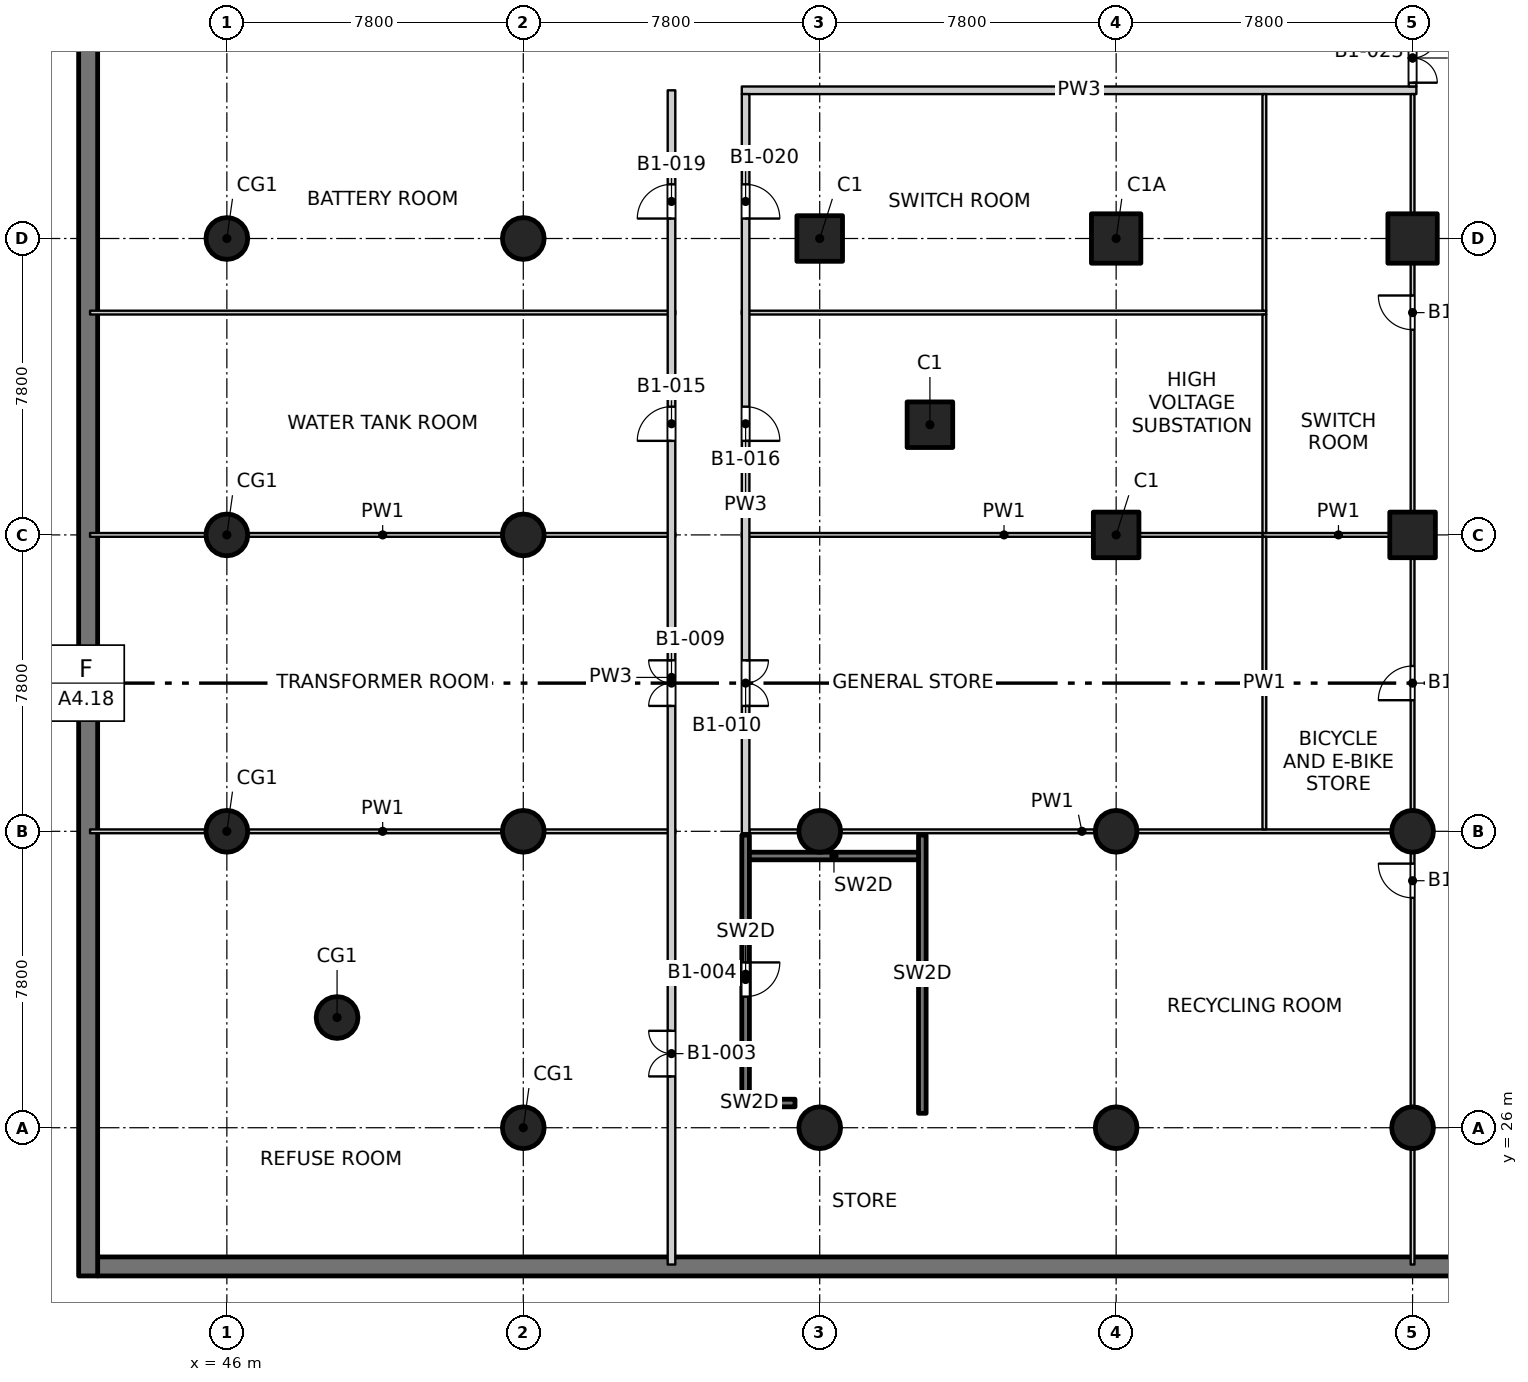
"""IFC4 building model, lengths in metres.
Left out: names, types, materials, properties, quantities, classifications, styles, units other than length and angle.
Written with IfcOpenShell. Run it as: python <this file> out.ifc"""

import sys

from ifc_helpers import new_model, si_unit, direction, frame, frame_2d, origin, origin_2d, place, context, subcontext, project, spatial, rectangle, circle, extrude, element, fill, save


model = new_model("IFC4")
c1 = context("Model", 3, precision=1e-05, world=origin(), true_north=direction((0.0, 1.0)))
c2 = subcontext(c1, "Body", "Model", "MODEL_VIEW")
j1 = project(units=[si_unit("LENGTHUNIT", "METRE"), si_unit("PLANEANGLEUNIT", "RADIAN")], contexts=[c1])
p1 = place(None, origin())
s1 = spatial("IfcSite", under=j1, at=p1, CompositionType="ELEMENT")
p2 = place(p1, origin())
s2 = spatial("IfcBuilding", under=s1, at=p2, CompositionType="ELEMENT")
p3 = place(p2, frame((0.0, 0.0, -4.5)))
s3 = spatial("IfcBuildingStorey", under=s2, at=p3, CompositionType="ELEMENT", Elevation=-4.5)
p4 = place(p3, frame((42.6, 22.35, -0.35), z_axis=(0.0, 0.0, 1.0), x_axis=(1.0, 0.0, 0.0)))
e1 = element("IfcWall", 1, at=p4, inside=s3, PredefinedType="SOLIDWALL", context=c2, shape_type="SweptSolid", body=[
    extrude(rectangle(XDim=84.8, YDim=0.5, at=frame_2d((42.4, 0.0))), origin(), (0.0, 0.0, 1.0), 4.45),
])
p5 = place(p3, frame((42.35, 22.1, -0.35), z_axis=(0.0, 0.0, 1.0), x_axis=(0.0, 1.0, 0.0)))
e2 = element("IfcWall", 2, at=p5, inside=s3, PredefinedType="SOLIDWALL", context=c2, shape_type="SweptSolid", body=[
    extrude(rectangle(XDim=70.2, YDim=0.5, at=frame_2d((35.1, 0.0))), origin(), (0.0, 0.0, 1.0), 4.45),
])
for number, where, z_axis, x_axis in (
    (3, (64.5, 44.5, -0.35), (0.0, 0.0, 1.0), (1.0, 0.0, 0.0)),
    (4, (61.6, 49.4, -0.35), (0.0, 0.0, 1.0), (1.0, 0.0, 0.0)),
    (5, (69.4, 41.6, -0.35), (0.0, 0.0, 1.0), (1.0, 0.0, 0.0)),
    (6, (77.2, 41.6, -0.35), (0.0, 0.0, 1.0), (1.0, 0.0, 0.0)),
):
    element("IfcColumn", number, at=place(p3, frame(where, z_axis=z_axis, x_axis=x_axis)), inside=s3, PredefinedType="COLUMN", context=c2, shape_type="SweptSolid", body=[
        extrude(rectangle(XDim=1.2, YDim=1.2, at=origin_2d()), origin(), (0.0, 0.0, 1.0), 4.45),
    ])
for number, where, z_axis, x_axis in (
    (7, (69.4, 49.4, -0.35), (0.0, 0.0, 1.0), (1.0, 0.0, 0.0)),
    (8, (77.2, 49.4, -0.35), (0.0, 0.0, 1.0), (1.0, 0.0, 0.0)),
):
    element("IfcColumn", number, at=place(p3, frame(where, z_axis=z_axis, x_axis=x_axis)), inside=s3, PredefinedType="COLUMN", context=c2, shape_type="SweptSolid", body=[
        extrude(rectangle(XDim=1.3, YDim=1.3, at=origin_2d()), origin(), (0.0, 0.0, 1.0), 4.45),
    ])
for number, where, z_axis, x_axis in (
    (9, (48.9, 28.9, -0.35), (0.0, 0.0, 1.0), (1.0, 0.0, 0.0)),
    (10, (46.0, 33.8, -0.35), (0.0, 0.0, 1.0), (1.0, 0.0, 0.0)),
    (11, (46.0, 41.6, -0.35), (0.0, 0.0, 1.0), (1.0, 0.0, 0.0)),
    (12, (46.0, 49.4, -0.35), (0.0, 0.0, 1.0), (1.0, 0.0, 0.0)),
    (13, (53.8, 26.0, -0.35), (0.0, 0.0, 1.0), (1.0, 0.0, 0.0)),
    (14, (53.8, 33.8, -0.35), (0.0, 0.0, 1.0), (1.0, 0.0, 0.0)),
    (15, (53.8, 41.6, -0.35), (0.0, 0.0, 1.0), (1.0, 0.0, 0.0)),
    (16, (53.8, 49.4, -0.35), (0.0, 0.0, 1.0), (1.0, 0.0, 0.0)),
    (17, (61.6, 26.0, -0.35), (0.0, 0.0, 1.0), (1.0, 0.0, 0.0)),
    (18, (61.6, 33.8, -0.35), (0.0, 0.0, 1.0), (1.0, 0.0, 0.0)),
    (19, (69.4, 26.0, -0.35), (0.0, 0.0, 1.0), (1.0, 0.0, 0.0)),
    (20, (69.4, 33.8, -0.35), (0.0, 0.0, 1.0), (1.0, 0.0, 0.0)),
    (21, (77.2, 26.0, -0.35), (0.0, 0.0, 1.0), (1.0, 0.0, 0.0)),
    (22, (77.2, 33.8, -0.35), (0.0, 0.0, 1.0), (1.0, 0.0, 0.0)),
):
    element("IfcColumn", number, at=place(p3, frame(where, z_axis=z_axis, x_axis=x_axis)), inside=s3, PredefinedType="COLUMN", context=c2, shape_type="SweptSolid", body=[
        extrude(circle(Radius=0.55, at=origin_2d()), origin(), (0.0, 0.0, 1.0), 4.45),
    ])
p6 = place(p3, frame((59.65, 26.38, 0.0), z_axis=(0.0, 0.0, 1.0), x_axis=(0.0, 1.0, 0.0)))
e23 = element("IfcWall", 23, at=p6, inside=s3, PredefinedType="SOLIDWALL", context=c2, shape_type="SweptSolid", body=[
    extrude(rectangle(XDim=7.32, YDim=0.2, at=frame_2d((3.66, 0.0))), origin(), (0.0, 0.0, 1.0), 4.1),
])
p7 = place(p6, frame((3.07, 0.0, 0.0)))
e24 = element("IfcOpeningElement", 24, at=p7, cuts=e23, PredefinedType="OPENING", context=c2, shape_type="SweptSolid", body=[
    extrude(rectangle(XDim=0.9, YDim=2.1, at=frame_2d((0.45, 1.05))), frame((0.0, 0.11, 0.0), z_axis=(0.0, -1.0, 0.0), x_axis=(1.0, 0.0, 0.0)), (0.0, 0.0, 1.0), 0.22),
])
p8 = place(p3, frame((64.3, 26.38, 0.0), z_axis=(0.0, 0.0, 1.0), x_axis=(0.0, 1.0, 0.0)))
e25 = element("IfcWall", 25, at=p8, inside=s3, PredefinedType="SOLIDWALL", context=c2, shape_type="SweptSolid", body=[
    extrude(rectangle(XDim=7.32, YDim=0.2, at=frame_2d((3.66, 0.0))), origin(), (0.0, 0.0, 1.0), 4.1),
])
p9 = place(p3, frame((59.75, 33.15, 0.0), z_axis=(0.0, 0.0, 1.0), x_axis=(1.0, 0.0, 0.0)))
e26 = element("IfcWall", 26, at=p9, inside=s3, PredefinedType="SOLIDWALL", context=c2, shape_type="SweptSolid", body=[
    extrude(rectangle(XDim=4.45, YDim=0.2, at=frame_2d((2.225, 0.0))), origin(), (0.0, 0.0, 1.0), 4.1),
])
p10 = place(p3, frame((59.75, 26.65, 0.0), z_axis=(0.0, 0.0, 1.0), x_axis=(1.0, 0.0, 0.0)))
e27 = element("IfcWall", 27, at=p10, inside=s3, PredefinedType="SOLIDWALL", context=c2, shape_type="SweptSolid", body=[
    extrude(rectangle(XDim=1.2, YDim=0.2, at=frame_2d((0.6, 0.0))), origin(), (0.0, 0.0, 1.0), 4.1),
])
p11 = place(p3, frame((42.4, 33.8, 0.0), z_axis=(0.0, 0.0, 1.0), x_axis=(1.0, 0.0, 0.0)))
e28 = element("IfcWall", 28, at=p11, inside=s3, PredefinedType="PARTITIONING", context=c2, shape_type="SweptSolid", body=[
    extrude(rectangle(XDim=15.4, YDim=0.1, at=frame_2d((7.7, 0.0))), origin(), (0.0, 0.0, 1.0), 4.1),
])
p12 = place(p3, frame((59.75, 33.8, 0.0), z_axis=(0.0, 0.0, 1.0), x_axis=(1.0, 0.0, 0.0)))
e29 = element("IfcWall", 29, at=p12, inside=s3, PredefinedType="PARTITIONING", context=c2, shape_type="SweptSolid", body=[
    extrude(rectangle(XDim=17.5, YDim=0.1, at=frame_2d((8.75, 0.0))), origin(), (0.0, 0.0, 1.0), 4.1),
])
p13 = place(p3, frame((42.4, 41.6, 0.0), z_axis=(0.0, 0.0, 1.0), x_axis=(1.0, 0.0, 0.0)))
e30 = element("IfcWall", 30, at=p13, inside=s3, PredefinedType="PARTITIONING", context=c2, shape_type="SweptSolid", body=[
    extrude(rectangle(XDim=15.4, YDim=0.1, at=frame_2d((7.7, 0.0))), origin(), (0.0, 0.0, 1.0), 4.1),
])
p14 = place(p3, frame((59.55, 41.6, 0.0), z_axis=(0.0, 0.0, 1.0), x_axis=(1.0, 0.0, 0.0)))
e31 = element("IfcWall", 31, at=p14, inside=s3, PredefinedType="PARTITIONING", context=c2, shape_type="SweptSolid", body=[
    extrude(rectangle(XDim=13.8, YDim=0.1, at=frame_2d((6.9, 0.0))), origin(), (0.0, 0.0, 1.0), 4.1),
])
p15 = place(p3, frame((73.25, 41.6, 0.0), z_axis=(0.0, 0.0, 1.0), x_axis=(1.0, 0.0, 0.0)))
e32 = element("IfcWall", 32, at=p15, inside=s3, PredefinedType="PARTITIONING", context=c2, shape_type="SweptSolid", body=[
    extrude(rectangle(XDim=4.0, YDim=0.1, at=frame_2d((2.0, 0.0))), origin(), (0.0, 0.0, 1.0), 4.1),
])
p16 = place(p3, frame((42.4, 47.45, 0.0), z_axis=(0.0, 0.0, 1.0), x_axis=(1.0, 0.0, 0.0)))
e33 = element("IfcWall", 33, at=p16, inside=s3, PredefinedType="PARTITIONING", context=c2, shape_type="SweptSolid", body=[
    extrude(rectangle(XDim=15.4, YDim=0.1, at=frame_2d((7.7, 0.0))), origin(), (0.0, 0.0, 1.0), 4.1),
])
p17 = place(p3, frame((59.55, 47.45, 0.0), z_axis=(0.0, 0.0, 1.0), x_axis=(1.0, 0.0, 0.0)))
e34 = element("IfcWall", 34, at=p17, inside=s3, PredefinedType="PARTITIONING", context=c2, shape_type="SweptSolid", body=[
    extrude(rectangle(XDim=13.8, YDim=0.1, at=frame_2d((6.9, 0.0))), origin(), (0.0, 0.0, 1.0), 4.1),
])
p18 = place(p3, frame((59.55, 53.3, 0.0), z_axis=(0.0, 0.0, 1.0), x_axis=(1.0, 0.0, 0.0)))
e35 = element("IfcWall", 35, at=p18, inside=s3, PredefinedType="PARTITIONING", context=c2, shape_type="SweptSolid", body=[
    extrude(rectangle(XDim=17.75, YDim=0.2, at=frame_2d((8.875, 0.0))), origin(), (0.0, 0.0, 1.0), 4.1),
])
p19 = place(p3, frame((57.7, 22.4, 0.0), z_axis=(0.0, 0.0, 1.0), x_axis=(0.0, 1.0, 0.0)))
e36 = element("IfcWall", 36, at=p19, inside=s3, PredefinedType="PARTITIONING", context=c2, shape_type="SweptSolid", body=[
    extrude(rectangle(XDim=30.9, YDim=0.2, at=frame_2d((15.45, 0.0))), origin(), (0.0, 0.0, 1.0), 4.1),
])
p20 = place(p19, frame((4.95, 0.0, 0.0)))
e37 = element("IfcOpeningElement", 37, at=p20, cuts=e36, PredefinedType="OPENING", context=c2, shape_type="SweptSolid", body=[
    extrude(rectangle(XDim=1.2, YDim=2.1, at=frame_2d((0.6, 1.05))), frame((0.0, 0.11, 0.0), z_axis=(0.0, -1.0, 0.0), x_axis=(1.0, 0.0, 0.0)), (0.0, 0.0, 1.0), 0.22),
])
p21 = place(p19, frame((14.7, 0.0, 0.0)))
e38 = element("IfcOpeningElement", 38, at=p21, cuts=e36, PredefinedType="OPENING", context=c2, shape_type="SweptSolid", body=[
    extrude(rectangle(XDim=1.2, YDim=2.1, at=frame_2d((0.6, 1.05))), frame((0.0, 0.11, 0.0), z_axis=(0.0, -1.0, 0.0), x_axis=(1.0, 0.0, 0.0)), (0.0, 0.0, 1.0), 0.22),
])
p22 = place(p19, frame((21.675, 0.0, 0.0)))
e39 = element("IfcOpeningElement", 39, at=p22, cuts=e36, PredefinedType="OPENING", context=c2, shape_type="SweptSolid", body=[
    extrude(rectangle(XDim=0.9, YDim=2.1, at=frame_2d((0.45, 1.05))), frame((0.0, 0.11, 0.0), z_axis=(0.0, -1.0, 0.0), x_axis=(1.0, 0.0, 0.0)), (0.0, 0.0, 1.0), 0.22),
])
p23 = place(p19, frame((27.525, 0.0, 0.0)))
e40 = element("IfcOpeningElement", 40, at=p23, cuts=e36, PredefinedType="OPENING", context=c2, shape_type="SweptSolid", body=[
    extrude(rectangle(XDim=0.9, YDim=2.1, at=frame_2d((0.45, 1.05))), frame((0.0, 0.11, 0.0), z_axis=(0.0, -1.0, 0.0), x_axis=(1.0, 0.0, 0.0)), (0.0, 0.0, 1.0), 0.22),
])
p24 = place(p3, frame((59.65, 33.75, 0.0), z_axis=(0.0, 0.0, 1.0), x_axis=(0.0, 1.0, 0.0)))
e41 = element("IfcWall", 41, at=p24, inside=s3, PredefinedType="PARTITIONING", context=c2, shape_type="SweptSolid", body=[
    extrude(rectangle(XDim=19.45, YDim=0.2, at=frame_2d((9.725, 0.0))), origin(), (0.0, 0.0, 1.0), 4.1),
])
p25 = place(p24, frame((3.35, 0.0, 0.0)))
e42 = element("IfcOpeningElement", 42, at=p25, cuts=e41, PredefinedType="OPENING", context=c2, shape_type="SweptSolid", body=[
    extrude(rectangle(XDim=1.2, YDim=2.1, at=frame_2d((0.6, 1.05))), frame((0.0, 0.11, 0.0), z_axis=(0.0, -1.0, 0.0), x_axis=(1.0, 0.0, 0.0)), (0.0, 0.0, 1.0), 0.22),
])
p26 = place(p24, frame((10.325, 0.0, 0.0)))
e43 = element("IfcOpeningElement", 43, at=p26, cuts=e41, PredefinedType="OPENING", context=c2, shape_type="SweptSolid", body=[
    extrude(rectangle(XDim=0.9, YDim=2.1, at=frame_2d((0.45, 1.05))), frame((0.0, 0.11, 0.0), z_axis=(0.0, -1.0, 0.0), x_axis=(1.0, 0.0, 0.0)), (0.0, 0.0, 1.0), 0.22),
])
p27 = place(p24, frame((16.175, 0.0, 0.0)))
e44 = element("IfcOpeningElement", 44, at=p27, cuts=e41, PredefinedType="OPENING", context=c2, shape_type="SweptSolid", body=[
    extrude(rectangle(XDim=0.9, YDim=2.1, at=frame_2d((0.45, 1.05))), frame((0.0, 0.11, 0.0), z_axis=(0.0, -1.0, 0.0), x_axis=(1.0, 0.0, 0.0)), (0.0, 0.0, 1.0), 0.22),
])
p28 = place(p3, frame((73.3, 33.85, 0.0), z_axis=(0.0, 0.0, 1.0), x_axis=(0.0, 1.0, 0.0)))
e45 = element("IfcWall", 45, at=p28, inside=s3, PredefinedType="PARTITIONING", context=c2, shape_type="SweptSolid", body=[
    extrude(rectangle(XDim=7.7, YDim=0.1, at=frame_2d((3.85, 0.0))), origin(), (0.0, 0.0, 1.0), 4.1),
])
p29 = place(p3, frame((73.3, 41.65, 0.0), z_axis=(0.0, 0.0, 1.0), x_axis=(0.0, 1.0, 0.0)))
e46 = element("IfcWall", 46, at=p29, inside=s3, PredefinedType="PARTITIONING", context=c2, shape_type="SweptSolid", body=[
    extrude(rectangle(XDim=5.75, YDim=0.1, at=frame_2d((2.875, 0.0))), origin(), (0.0, 0.0, 1.0), 4.1),
])
p30 = place(p3, frame((73.3, 47.5, 0.0), z_axis=(0.0, 0.0, 1.0), x_axis=(0.0, 1.0, 0.0)))
e47 = element("IfcWall", 47, at=p30, inside=s3, PredefinedType="PARTITIONING", context=c2, shape_type="SweptSolid", body=[
    extrude(rectangle(XDim=5.7, YDim=0.1, at=frame_2d((2.85, 0.0))), origin(), (0.0, 0.0, 1.0), 4.1),
])
p31 = place(p3, frame((77.2, 22.4, 0.0), z_axis=(0.0, 0.0, 1.0), x_axis=(0.0, 1.0, 0.0)))
e48 = element("IfcWall", 48, at=p31, inside=s3, PredefinedType="PARTITIONING", context=c2, shape_type="SweptSolid", body=[
    extrude(rectangle(XDim=30.8, YDim=0.1, at=frame_2d((15.4, 0.0))), origin(), (0.0, 0.0, 1.0), 4.1),
])
p32 = place(p31, frame((9.65, 0.0, 0.0)))
e49 = element("IfcOpeningElement", 49, at=p32, cuts=e48, PredefinedType="OPENING", context=c2, shape_type="SweptSolid", body=[
    extrude(rectangle(XDim=0.9, YDim=2.1, at=frame_2d((0.45, 1.05))), frame((0.0, 0.06, 0.0), z_axis=(0.0, -1.0, 0.0), x_axis=(1.0, 0.0, 0.0)), (0.0, 0.0, 1.0), 0.12),
])
p33 = place(p31, frame((14.85, 0.0, 0.0)))
e50 = element("IfcOpeningElement", 50, at=p33, cuts=e48, PredefinedType="OPENING", context=c2, shape_type="SweptSolid", body=[
    extrude(rectangle(XDim=0.9, YDim=2.1, at=frame_2d((0.45, 1.05))), frame((0.0, 0.06, 0.0), z_axis=(0.0, -1.0, 0.0), x_axis=(1.0, 0.0, 0.0)), (0.0, 0.0, 1.0), 0.12),
])
p34 = place(p31, frame((24.6, 0.0, 0.0)))
e51 = element("IfcOpeningElement", 51, at=p34, cuts=e48, PredefinedType="OPENING", context=c2, shape_type="SweptSolid", body=[
    extrude(rectangle(XDim=0.9, YDim=2.1, at=frame_2d((0.45, 1.05))), frame((0.0, 0.06, 0.0), z_axis=(0.0, -1.0, 0.0), x_axis=(1.0, 0.0, 0.0)), (0.0, 0.0, 1.0), 0.12),
])
p35 = place(p3, frame((77.2, 53.4, 0.0), z_axis=(0.0, 0.0, 1.0), x_axis=(0.0, 1.0, 0.0)))
e52 = element("IfcWall", 52, at=p35, inside=s3, PredefinedType="PARTITIONING", context=c2, shape_type="SweptSolid", body=[
    extrude(rectangle(XDim=1.5, YDim=0.2, at=frame_2d((0.75, 0.0))), origin(), (0.0, 0.0, 1.0), 4.1),
])
p36 = place(p35, frame((0.1, 0.0, 0.0)))
e53 = element("IfcOpeningElement", 53, at=p36, cuts=e52, PredefinedType="OPENING", context=c2, shape_type="SweptSolid", body=[
    extrude(rectangle(XDim=1.3, YDim=2.1, at=frame_2d((0.65, 1.05))), frame((0.0, 0.11, 0.0), z_axis=(0.0, -1.0, 0.0), x_axis=(1.0, 0.0, 0.0)), (0.0, 0.0, 1.0), 0.22),
])
p37 = place(p20, origin())
e54 = element("IfcDoor", 54, at=p37, inside=s3, OperationType="DOUBLE_DOOR_SINGLE_SWING", PredefinedType="DOOR", context=c2, shape_type="SweptSolid", body=[
    extrude(rectangle(XDim=1.2, YDim=2.1, at=frame_2d((0.6, 1.05))), frame((0.0, 0.025, 0.0), z_axis=(0.0, -1.0, 0.0), x_axis=(1.0, 0.0, 0.0)), (0.0, 0.0, 1.0), 0.05),
])
fill(e37, e54)
p38 = place(p7, origin())
e55 = element("IfcDoor", 55, at=p38, inside=s3, OperationType="SINGLE_SWING_LEFT", PredefinedType="DOOR", context=c2, shape_type="SweptSolid", body=[
    extrude(rectangle(XDim=0.9, YDim=2.1, at=frame_2d((0.45, 1.05))), frame((0.0, 0.025, 0.0), z_axis=(0.0, -1.0, 0.0), x_axis=(1.0, 0.0, 0.0)), (0.0, 0.0, 1.0), 0.05),
])
fill(e24, e55)
p39 = place(p32, origin())
e56 = element("IfcDoor", 56, at=p39, inside=s3, OperationType="SINGLE_SWING_RIGHT", PredefinedType="DOOR", context=c2, shape_type="SweptSolid", body=[
    extrude(rectangle(XDim=0.9, YDim=2.1, at=frame_2d((0.45, 1.05))), frame((0.0, 0.025, 0.0), z_axis=(0.0, -1.0, 0.0), x_axis=(1.0, 0.0, 0.0)), (0.0, 0.0, 1.0), 0.05),
])
fill(e49, e56)
p40 = place(p21, origin())
e57 = element("IfcDoor", 57, at=p40, inside=s3, OperationType="DOUBLE_DOOR_SINGLE_SWING", PredefinedType="DOOR", context=c2, shape_type="SweptSolid", body=[
    extrude(rectangle(XDim=1.2, YDim=2.1, at=frame_2d((0.6, 1.05))), frame((0.0, 0.025, 0.0), z_axis=(0.0, -1.0, 0.0), x_axis=(1.0, 0.0, 0.0)), (0.0, 0.0, 1.0), 0.05),
])
fill(e38, e57)
p41 = place(p25, origin())
e58 = element("IfcDoor", 58, at=p41, inside=s3, OperationType="DOUBLE_DOOR_SINGLE_SWING", PredefinedType="DOOR", context=c2, shape_type="SweptSolid", body=[
    extrude(rectangle(XDim=1.2, YDim=2.1, at=frame_2d((0.6, 1.05))), frame((0.0, 0.025, 0.0), z_axis=(0.0, -1.0, 0.0), x_axis=(1.0, 0.0, 0.0)), (0.0, 0.0, 1.0), 0.05),
])
fill(e42, e58)
p42 = place(p33, origin())
e59 = element("IfcDoor", 59, at=p42, inside=s3, OperationType="SINGLE_SWING_LEFT", PredefinedType="DOOR", context=c2, shape_type="SweptSolid", body=[
    extrude(rectangle(XDim=0.9, YDim=2.1, at=frame_2d((0.45, 1.05))), frame((0.0, 0.025, 0.0), z_axis=(0.0, -1.0, 0.0), x_axis=(1.0, 0.0, 0.0)), (0.0, 0.0, 1.0), 0.05),
])
fill(e50, e59)
p43 = place(p22, origin())
e60 = element("IfcDoor", 60, at=p43, inside=s3, OperationType="SINGLE_SWING_LEFT", PredefinedType="DOOR", context=c2, shape_type="SweptSolid", body=[
    extrude(rectangle(XDim=0.9, YDim=2.1, at=frame_2d((0.45, 1.05))), frame((0.0, 0.025, 0.0), z_axis=(0.0, -1.0, 0.0), x_axis=(1.0, 0.0, 0.0)), (0.0, 0.0, 1.0), 0.05),
])
fill(e39, e60)
p44 = place(p26, origin())
e61 = element("IfcDoor", 61, at=p44, inside=s3, OperationType="SINGLE_SWING_RIGHT", PredefinedType="DOOR", context=c2, shape_type="SweptSolid", body=[
    extrude(rectangle(XDim=0.9, YDim=2.1, at=frame_2d((0.45, 1.05))), frame((0.0, 0.025, 0.0), z_axis=(0.0, -1.0, 0.0), x_axis=(1.0, 0.0, 0.0)), (0.0, 0.0, 1.0), 0.05),
])
fill(e43, e61)
p45 = place(p34, origin())
e62 = element("IfcDoor", 62, at=p45, inside=s3, OperationType="SINGLE_SWING_RIGHT", PredefinedType="DOOR", context=c2, shape_type="SweptSolid", body=[
    extrude(rectangle(XDim=0.9, YDim=2.1, at=frame_2d((0.45, 1.05))), frame((0.0, 0.025, 0.0), z_axis=(0.0, -1.0, 0.0), x_axis=(1.0, 0.0, 0.0)), (0.0, 0.0, 1.0), 0.05),
])
fill(e51, e62)
p46 = place(p23, origin())
e63 = element("IfcDoor", 63, at=p46, inside=s3, OperationType="SINGLE_SWING_LEFT", PredefinedType="DOOR", context=c2, shape_type="SweptSolid", body=[
    extrude(rectangle(XDim=0.9, YDim=2.1, at=frame_2d((0.45, 1.05))), frame((0.0, 0.025, 0.0), z_axis=(0.0, -1.0, 0.0), x_axis=(1.0, 0.0, 0.0)), (0.0, 0.0, 1.0), 0.05),
])
fill(e40, e63)
p47 = place(p27, origin())
e64 = element("IfcDoor", 64, at=p47, inside=s3, OperationType="SINGLE_SWING_RIGHT", PredefinedType="DOOR", context=c2, shape_type="SweptSolid", body=[
    extrude(rectangle(XDim=0.9, YDim=2.1, at=frame_2d((0.45, 1.05))), frame((0.0, 0.025, 0.0), z_axis=(0.0, -1.0, 0.0), x_axis=(1.0, 0.0, 0.0)), (0.0, 0.0, 1.0), 0.05),
])
fill(e44, e64)
p48 = place(p36, origin())
e65 = element("IfcDoor", 65, at=p48, inside=s3, OperationType="DOUBLE_DOOR_SINGLE_SWING", PredefinedType="DOOR", context=c2, shape_type="SweptSolid", body=[
    extrude(rectangle(XDim=1.3, YDim=2.1, at=frame_2d((0.65, 1.05))), frame((0.0, 0.025, 0.0), z_axis=(0.0, -1.0, 0.0), x_axis=(1.0, 0.0, 0.0)), (0.0, 0.0, 1.0), 0.05),
])
fill(e53, e65)
save(model, sys.argv[1])
